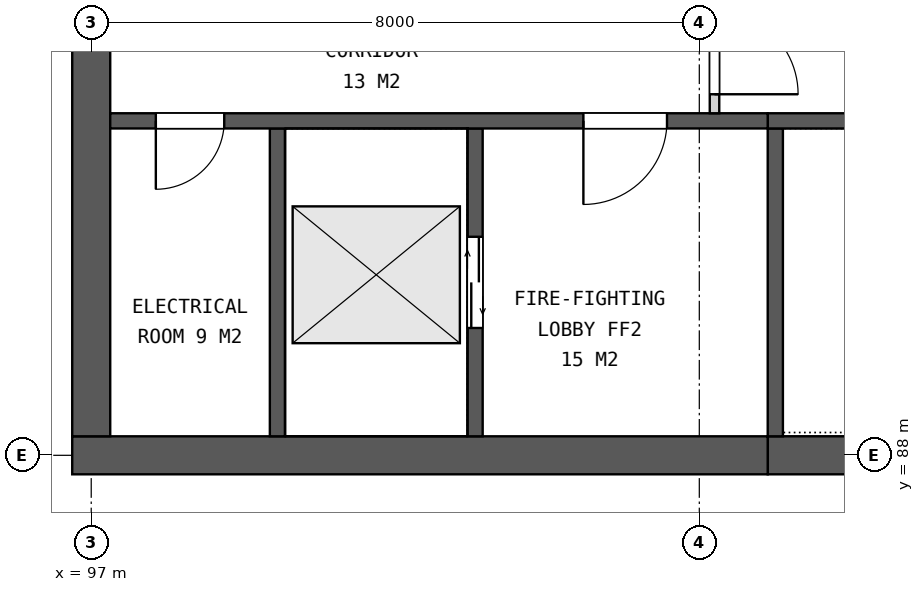
"""IFC4 building model, lengths in metres.
Left out: names, types, materials, properties, quantities, classifications, styles, units other than length and angle.
Written with IfcOpenShell. Run it as: python <this file> out.ifc"""

import sys

from ifc_helpers import new_model, si_unit, direction, frame, frame_2d, origin, place, context, subcontext, project, spatial, rectangle, extrude, element, fill, save


model = new_model("IFC4")
c1 = context("Model", 3, precision=1e-05, world=origin(), true_north=direction((0.0, 1.0)))
c2 = subcontext(c1, "Body", "Model", "MODEL_VIEW")
j1 = project(units=[si_unit("LENGTHUNIT", "METRE"), si_unit("PLANEANGLEUNIT", "RADIAN")], contexts=[c1])
p1 = place(None, origin())
s1 = spatial("IfcSite", under=j1, at=p1, CompositionType="ELEMENT")
p2 = place(p1, origin())
s2 = spatial("IfcBuilding", under=s1, at=p2, CompositionType="ELEMENT")
p3 = place(p2, frame((0.0, 0.0, 245.1)))
s3 = spatial("IfcBuildingStorey", under=s2, at=p3, CompositionType="ELEMENT", Elevation=245.1)
p4 = place(p3, frame((113.0, 88.0, 0.0), z_axis=(0.0, 0.0, 1.0), x_axis=(-1.0, 0.0, 0.0)))
e1 = element("IfcWall", 1, at=p4, inside=s3, PredefinedType="SHEAR", context=c2, shape_type="SweptSolid", body=[
    extrude(rectangle(XDim=7.1, YDim=0.5, at=frame_2d((3.55, 0.0))), origin(), (0.0, 0.0, 1.0), 4.2),
])
p5 = place(p3, frame((105.9, 88.0, 0.0), z_axis=(0.0, 0.0, 1.0), x_axis=(-1.0, 0.0, 0.0)))
e2 = element("IfcWall", 2, at=p5, inside=s3, PredefinedType="SHEAR", context=c2, shape_type="SweptSolid", body=[
    extrude(rectangle(XDim=9.15, YDim=0.5, at=frame_2d((4.575, 0.0))), origin(), (0.0, 0.0, 1.0), 4.2),
])
p6 = place(p3, frame((97.0, 111.75, 0.0), z_axis=(0.0, 0.0, 1.0), x_axis=(0.0, -1.0, 0.0)))
e3 = element("IfcWall", 3, at=p6, inside=s3, PredefinedType="SHEAR", context=c2, shape_type="SweptSolid", body=[
    extrude(rectangle(XDim=23.5, YDim=0.5, at=frame_2d((11.75, 0.0))), origin(), (0.0, 0.0, 1.0), 4.2),
])
p7 = place(p6, frame((9.95, 0.0, 0.15)))
e4 = element("IfcOpeningElement", 4, at=p7, cuts=e3, PredefinedType="OPENING", context=c2, shape_type="SweptSolid", body=[
    extrude(rectangle(XDim=3.6, YDim=3.0, at=frame_2d((1.8, 1.5))), frame((0.0, 0.26, 0.0), z_axis=(0.0, -1.0, 0.0), x_axis=(1.0, 0.0, 0.0)), (0.0, 0.0, 1.0), 0.52),
])
p8 = place(p3, frame((106.0, 92.3, 0.0), z_axis=(0.0, 0.0, 1.0), x_axis=(0.0, -1.0, 0.0)))
e5 = element("IfcWall", 5, at=p8, inside=s3, PredefinedType="SHEAR", context=c2, shape_type="SweptSolid", body=[
    extrude(rectangle(XDim=4.05, YDim=0.2, at=frame_2d((2.025, 0.0))), origin(), (0.0, 0.0, 1.0), 4.2),
])
p9 = place(p3, frame((102.05, 92.3, 0.0), z_axis=(0.0, 0.0, 1.0), x_axis=(0.0, -1.0, 0.0)))
e6 = element("IfcWall", 6, at=p9, inside=s3, PredefinedType="SHEAR", context=c2, shape_type="SweptSolid", body=[
    extrude(rectangle(XDim=4.05, YDim=0.2, at=frame_2d((2.025, 0.0))), origin(), (0.0, 0.0, 1.0), 4.2),
])
p10 = place(p9, frame((1.425, 0.0, 0.0)))
e7 = element("IfcOpeningElement", 7, at=p10, cuts=e6, PredefinedType="OPENING", context=c2, shape_type="SweptSolid", body=[
    extrude(rectangle(XDim=1.2, YDim=2.1, at=frame_2d((0.6, 1.05))), frame((0.0, 0.11, 0.0), z_axis=(0.0, -1.0, 0.0), x_axis=(1.0, 0.0, 0.0)), (0.0, 0.0, 1.0), 0.22),
])
p11 = place(p3, frame((99.45, 92.3, 0.0), z_axis=(0.0, 0.0, 1.0), x_axis=(0.0, -1.0, 0.0)))
e8 = element("IfcWall", 8, at=p11, inside=s3, PredefinedType="SHEAR", context=c2, shape_type="SweptSolid", body=[
    extrude(rectangle(XDim=4.05, YDim=0.2, at=frame_2d((2.025, 0.0))), origin(), (0.0, 0.0, 1.0), 4.2),
])
p12 = place(p3, frame((112.7, 92.4, 0.0), z_axis=(0.0, 0.0, 1.0), x_axis=(-1.0, 0.0, 0.0)))
e9 = element("IfcWall", 9, at=p12, inside=s3, PredefinedType="SHEAR", context=c2, shape_type="SweptSolid", body=[
    extrude(rectangle(XDim=6.8, YDim=0.2, at=frame_2d((3.4, 0.0))), origin(), (0.0, 0.0, 1.0), 4.2),
])
p13 = place(p12, frame((0.15, 0.0, 0.0)))
e10 = element("IfcOpeningElement", 10, at=p13, cuts=e9, PredefinedType="OPENING", context=c2, shape_type="SweptSolid", body=[
    extrude(rectangle(XDim=1.0, YDim=2.1, at=frame_2d((0.5, 1.05))), frame((0.0, 0.11, 0.0), z_axis=(0.0, -1.0, 0.0), x_axis=(1.0, 0.0, 0.0)), (0.0, 0.0, 1.0), 0.22),
])
p14 = place(p3, frame((105.9, 92.4, 0.0), z_axis=(0.0, 0.0, 1.0), x_axis=(-1.0, 0.0, 0.0)))
e11 = element("IfcWall", 11, at=p14, inside=s3, PredefinedType="SHEAR", context=c2, shape_type="SweptSolid", body=[
    extrude(rectangle(XDim=8.65, YDim=0.2, at=frame_2d((4.325, 0.0))), origin(), (0.0, 0.0, 1.0), 4.2),
])
p15 = place(p14, frame((1.325, 0.0, 0.0)))
e12 = element("IfcOpeningElement", 12, at=p15, cuts=e11, PredefinedType="OPENING", context=c2, shape_type="SweptSolid", body=[
    extrude(rectangle(XDim=1.1, YDim=2.1, at=frame_2d((0.55, 1.05))), frame((0.0, 0.11, 0.0), z_axis=(0.0, -1.0, 0.0), x_axis=(1.0, 0.0, 0.0)), (0.0, 0.0, 1.0), 0.22),
])
p16 = place(p14, frame((7.15, 0.0, 0.0)))
e13 = element("IfcOpeningElement", 13, at=p16, cuts=e11, PredefinedType="OPENING", context=c2, shape_type="SweptSolid", body=[
    extrude(rectangle(XDim=0.9, YDim=2.1, at=frame_2d((0.45, 1.05))), frame((0.0, 0.11, 0.0), z_axis=(0.0, -1.0, 0.0), x_axis=(1.0, 0.0, 0.0)), (0.0, 0.0, 1.0), 0.22),
])
p17 = place(p3, frame((105.2, 94.1, 0.0), z_axis=(0.0, 0.0, 1.0), x_axis=(0.0, -1.0, 0.0)))
e14 = element("IfcWall", 14, at=p17, inside=s3, PredefinedType="PARTITIONING", context=c2, shape_type="SweptSolid", body=[
    extrude(rectangle(XDim=1.6, YDim=0.125, at=frame_2d((0.8, 0.0))), origin(), (0.0, 0.0, 1.0), 4.2),
])
p18 = place(p17, frame((0.25, 0.0, 0.0)))
e15 = element("IfcOpeningElement", 15, at=p18, cuts=e14, PredefinedType="OPENING", context=c2, shape_type="SweptSolid", body=[
    extrude(rectangle(XDim=1.1, YDim=2.1, at=frame_2d((0.55, 1.05))), frame((0.0, 0.073, 0.0), z_axis=(0.0, -1.0, 0.0), x_axis=(1.0, 0.0, 0.0)), (0.0, 0.0, 1.0), 0.145),
])
p19 = place(p10, origin())
e16 = element("IfcDoor", 16, at=p19, inside=s3, OperationType="DOUBLE_DOOR_SLIDING", PredefinedType="DOOR", context=c2, shape_type="SweptSolid", body=[
    extrude(rectangle(XDim=1.2, YDim=2.1, at=frame_2d((0.6, 1.05))), frame((0.0, 0.025, 0.0), z_axis=(0.0, -1.0, 0.0), x_axis=(1.0, 0.0, 0.0)), (0.0, 0.0, 1.0), 0.05),
])
fill(e7, e16)
p20 = place(p15, origin())
e17 = element("IfcDoor", 17, at=p20, inside=s3, OperationType="SINGLE_SWING_RIGHT", PredefinedType="DOOR", context=c2, shape_type="SweptSolid", body=[
    extrude(rectangle(XDim=1.1, YDim=2.1, at=frame_2d((0.55, 1.05))), frame((0.0, 0.025, 0.0), z_axis=(0.0, -1.0, 0.0), x_axis=(1.0, 0.0, 0.0)), (0.0, 0.0, 1.0), 0.05),
])
fill(e12, e17)
p21 = place(p16, origin())
e18 = element("IfcDoor", 18, at=p21, inside=s3, OperationType="SINGLE_SWING_RIGHT", PredefinedType="DOOR", context=c2, shape_type="SweptSolid", body=[
    extrude(rectangle(XDim=0.9, YDim=2.1, at=frame_2d((0.45, 1.05))), frame((0.0, 0.025, 0.0), z_axis=(0.0, -1.0, 0.0), x_axis=(1.0, 0.0, 0.0)), (0.0, 0.0, 1.0), 0.05),
])
fill(e13, e18)
p22 = place(p18, origin())
e19 = element("IfcDoor", 19, at=p22, inside=s3, OperationType="SINGLE_SWING_RIGHT", PredefinedType="DOOR", context=c2, shape_type="SweptSolid", body=[
    extrude(rectangle(XDim=1.1, YDim=2.1, at=frame_2d((0.55, 1.05))), frame((0.0, 0.025, 0.0), z_axis=(0.0, -1.0, 0.0), x_axis=(1.0, 0.0, 0.0)), (0.0, 0.0, 1.0), 0.05),
])
fill(e15, e19)
save(model, sys.argv[1])
